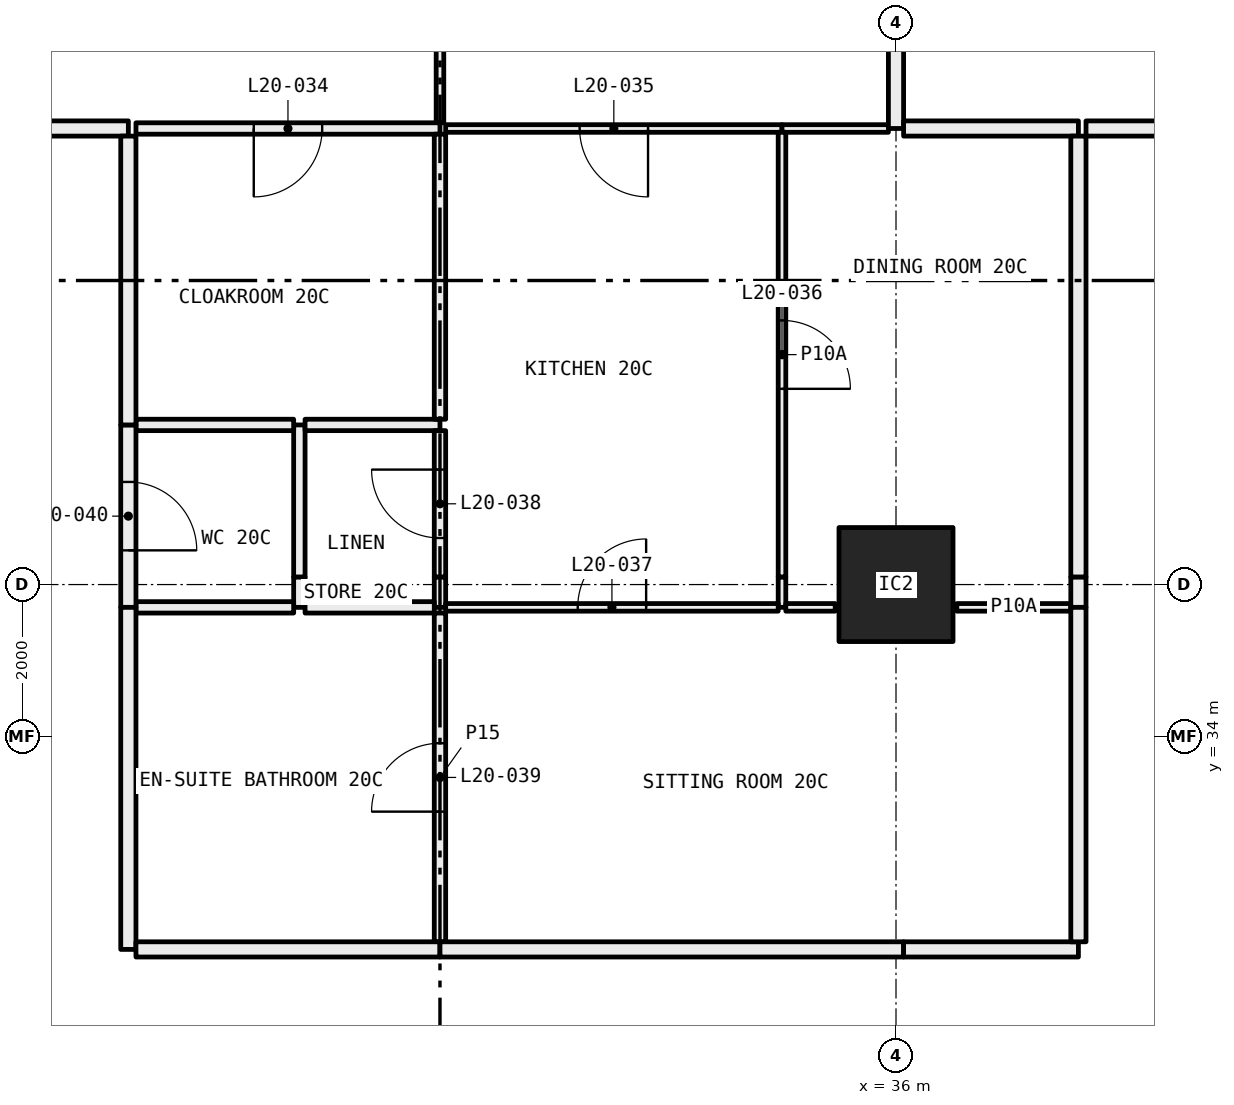
"""IFC4 building model, lengths in metres.
Left out: names, types, materials, properties, quantities, classifications, styles, units other than length and angle.
Written with IfcOpenShell. Run it as: python <this file> out.ifc"""

import sys

from ifc_helpers import new_model, si_unit, direction, frame, frame_2d, origin, origin_2d, place, context, subcontext, project, spatial, rectangle, hollow_rectangle, extrude, element, fill, save


model = new_model("IFC4")
c1 = context("Model", 3, precision=1e-05, world=origin(), true_north=direction((0.0, 1.0)))
c2 = subcontext(c1, "Body", "Model", "MODEL_VIEW")
j1 = project(units=[si_unit("LENGTHUNIT", "METRE"), si_unit("PLANEANGLEUNIT", "RADIAN")], contexts=[c1])
p1 = place(None, origin())
s1 = spatial("IfcSite", under=j1, at=p1, CompositionType="ELEMENT")
p2 = place(p1, origin())
s2 = spatial("IfcBuilding", under=s1, at=p2, CompositionType="ELEMENT")
p3 = place(p2, frame((0.0, 0.0, 81.75)))
s3 = spatial("IfcBuildingStorey", under=s2, at=p3, CompositionType="ELEMENT", Elevation=81.75)
p4 = place(p3, frame((36.0, 36.0, 0.0), z_axis=(0.0, 0.0, 1.0), x_axis=(1.0, 0.0, 0.0)))
e1 = element("IfcColumn", 1, at=p4, inside=s3, PredefinedType="COLUMN", context=c2, shape_type="SweptSolid", body=[
    extrude(hollow_rectangle(XDim=1.5, YDim=1.5, WallThickness=0.065, at=origin_2d()), origin(), (0.0, 0.0, 1.0), 3.05),
])
p5 = place(p3, frame((30.0, 42.075, 0.0), z_axis=(0.0, 0.0, 1.0), x_axis=(0.0, 1.0, 0.0)))
e2 = element("IfcWall", 2, at=p5, inside=s3, PredefinedType="PARTITIONING", context=c2, shape_type="SweptSolid", body=[
    extrude(rectangle(XDim=5.205, YDim=0.1, at=frame_2d((2.603, 0.0))), origin(), (0.0, 0.0, 1.0), 3.05),
])
p6 = place(p5, frame((2.153, 0.0, 0.0)))
e3 = element("IfcOpeningElement", 3, at=p6, cuts=e2, PredefinedType="OPENING", context=c2, shape_type="SweptSolid", body=[
    extrude(rectangle(XDim=0.9, YDim=2.1, at=frame_2d((0.45, 1.05))), frame((0.0, 0.06, 0.0), z_axis=(0.0, -1.0, 0.0), x_axis=(1.0, 0.0, 0.0)), (0.0, 0.0, 1.0), 0.12),
])
p7 = place(p3, frame((26.0, 42.0, 0.0), z_axis=(0.0, 0.0, 1.0), x_axis=(1.0, 0.0, 0.0)))
e4 = element("IfcWall", 4, at=p7, inside=s3, PredefinedType="PARTITIONING", context=c2, shape_type="SweptSolid", body=[
    extrude(rectangle(XDim=4.0, YDim=0.15, at=frame_2d((2.0, 0.0))), origin(), (0.0, 0.0, 1.0), 3.05),
])
p8 = place(p7, frame((1.55, 0.0, 0.0)))
e5 = element("IfcOpeningElement", 5, at=p8, cuts=e4, PredefinedType="OPENING", context=c2, shape_type="SweptSolid", body=[
    extrude(rectangle(XDim=0.9, YDim=2.1, at=frame_2d((0.45, 1.05))), frame((0.0, 0.085, 0.0), z_axis=(0.0, -1.0, 0.0), x_axis=(1.0, 0.0, 0.0)), (0.0, 0.0, 1.0), 0.17),
])
p9 = place(p3, frame((24.0, 42.0, 0.0), z_axis=(0.0, 0.0, 1.0), x_axis=(1.0, 0.0, 0.0)))
e6 = element("IfcWall", 6, at=p9, inside=s3, PredefinedType="PARTITIONING", context=c2, shape_type="SweptSolid", body=[
    extrude(rectangle(XDim=1.9, YDim=0.2, at=frame_2d((0.95, 0.0))), origin(), (0.0, 0.0, 1.0), 3.05),
])
p10 = place(p3, frame((30.075, 42.0, 0.0), z_axis=(0.0, 0.0, 1.0), x_axis=(1.0, 0.0, 0.0)))
e7 = element("IfcWall", 7, at=p10, inside=s3, PredefinedType="PARTITIONING", context=c2, shape_type="SweptSolid", body=[
    extrude(rectangle(XDim=4.425, YDim=0.1, at=frame_2d((2.212, 0.0))), origin(), (0.0, 0.0, 1.0), 3.05),
])
p11 = place(p10, frame((1.762, 0.0, 0.0)))
e8 = element("IfcOpeningElement", 8, at=p11, cuts=e7, PredefinedType="OPENING", context=c2, shape_type="SweptSolid", body=[
    extrude(rectangle(XDim=0.9, YDim=2.1, at=frame_2d((0.45, 1.05))), frame((0.0, 0.06, 0.0), z_axis=(0.0, -1.0, 0.0), x_axis=(1.0, 0.0, 0.0)), (0.0, 0.0, 1.0), 0.12),
])
p12 = place(p3, frame((34.5, 42.0, 0.0), z_axis=(0.0, 0.0, 1.0), x_axis=(1.0, 0.0, 0.0)))
e9 = element("IfcWall", 9, at=p12, inside=s3, PredefinedType="PARTITIONING", context=c2, shape_type="SweptSolid", body=[
    extrude(rectangle(XDim=1.4, YDim=0.1, at=frame_2d((0.7, 0.0))), origin(), (0.0, 0.0, 1.0), 3.05),
])
p13 = place(p3, frame((36.0, 42.0, 0.0), z_axis=(0.0, 0.0, 1.0), x_axis=(0.0, 1.0, 0.0)))
e10 = element("IfcWall", 10, at=p13, inside=s3, PredefinedType="PARTITIONING", context=c2, shape_type="SweptSolid", body=[
    extrude(rectangle(XDim=3.0, YDim=0.2, at=frame_2d((1.5, 0.0))), origin(), (0.0, 0.0, 1.0), 2.45),
])
p14 = place(p3, frame((28.15, 35.7, 0.0), z_axis=(0.0, 0.0, 1.0), x_axis=(0.0, 1.0, 0.0)))
e11 = element("IfcWall", 11, at=p14, inside=s3, PredefinedType="PARTITIONING", context=c2, shape_type="SweptSolid", body=[
    extrude(rectangle(XDim=0.4, YDim=0.15, at=frame_2d((0.2, 0.0))), origin(), (0.0, 0.0, 1.0), 2.45),
])
p15 = place(p3, frame((28.15, 36.1, 0.0), z_axis=(0.0, 0.0, 1.0), x_axis=(0.0, 1.0, 0.0)))
e12 = element("IfcWall", 12, at=p15, inside=s3, PredefinedType="PARTITIONING", context=c2, shape_type="SweptSolid", body=[
    extrude(rectangle(XDim=2.0, YDim=0.15, at=frame_2d((1.0, 0.0))), origin(), (0.0, 0.0, 1.0), 3.05),
])
for number, where, z_axis, x_axis in (
    (13, (28.075, 38.1, 0.0), (0.0, 0.0, 1.0), (-1.0, 0.0, 0.0)),
    (14, (26.0, 35.7, 0.0), (0.0, 0.0, 1.0), (1.0, 0.0, 0.0)),
):
    element("IfcWall", number, at=place(p3, frame(where, z_axis=z_axis, x_axis=x_axis)), inside=s3, PredefinedType="PARTITIONING", context=c2, shape_type="SweptSolid", body=[
        extrude(rectangle(XDim=2.075, YDim=0.15, at=frame_2d((1.038, 0.0))), origin(), (0.0, 0.0, 1.0), 3.05),
    ])
p16 = place(p3, frame((25.9, 38.1, 0.0), z_axis=(0.0, 0.0, 1.0), x_axis=(0.0, -1.0, 0.0)))
e15 = element("IfcWall", 15, at=p16, inside=s3, PredefinedType="PARTITIONING", context=c2, shape_type="SweptSolid", body=[
    extrude(rectangle(XDim=2.4, YDim=0.2, at=frame_2d((1.2, 0.0))), origin(), (0.0, 0.0, 1.0), 2.45),
])
p17 = place(p16, frame((0.75, 0.0, 0.0)))
e16 = element("IfcOpeningElement", 16, at=p17, cuts=e15, PredefinedType="OPENING", context=c2, shape_type="SweptSolid", body=[
    extrude(rectangle(XDim=0.9, YDim=2.1, at=frame_2d((0.45, 1.05))), frame((0.0, 0.11, 0.0), z_axis=(0.0, -1.0, 0.0), x_axis=(1.0, 0.0, 0.0)), (0.0, 0.0, 1.0), 0.22),
])
p18 = place(p3, frame((30.0, 38.1, 0.0), z_axis=(0.0, 0.0, 1.0), x_axis=(-1.0, 0.0, 0.0)))
e17 = element("IfcWall", 17, at=p18, inside=s3, PredefinedType="PARTITIONING", context=c2, shape_type="SweptSolid", body=[
    extrude(rectangle(XDim=1.775, YDim=0.15, at=frame_2d((0.887, 0.0))), origin(), (0.0, 0.0, 1.0), 3.05),
])
p19 = place(p3, frame((30.0, 35.7, 0.0), z_axis=(0.0, 0.0, 1.0), x_axis=(0.0, 1.0, 0.0)))
e18 = element("IfcWall", 18, at=p19, inside=s3, PredefinedType="PARTITIONING", context=c2, shape_type="SweptSolid", body=[
    extrude(rectangle(XDim=0.4, YDim=0.15, at=frame_2d((0.2, 0.0))), origin(), (0.0, 0.0, 1.0), 2.45),
])
p20 = place(p3, frame((30.0, 36.1, 0.0), z_axis=(0.0, 0.0, 1.0), x_axis=(0.0, 1.0, 0.0)))
e19 = element("IfcWall", 19, at=p20, inside=s3, PredefinedType="PARTITIONING", context=c2, shape_type="SweptSolid", body=[
    extrude(rectangle(XDim=1.925, YDim=0.15, at=frame_2d((0.962, 0.0))), origin(), (0.0, 0.0, 1.0), 3.05),
])
p21 = place(p20, frame((0.512, 0.0, 0.0)))
e20 = element("IfcOpeningElement", 20, at=p21, cuts=e19, PredefinedType="OPENING", context=c2, shape_type="SweptSolid", body=[
    extrude(rectangle(XDim=0.9, YDim=2.1, at=frame_2d((0.45, 1.05))), frame((0.0, 0.085, 0.0), z_axis=(0.0, -1.0, 0.0), x_axis=(1.0, 0.0, 0.0)), (0.0, 0.0, 1.0), 0.17),
])
p22 = place(p3, frame((28.225, 35.7, 0.0), z_axis=(0.0, 0.0, 1.0), x_axis=(1.0, 0.0, 0.0)))
e21 = element("IfcWall", 21, at=p22, inside=s3, PredefinedType="PARTITIONING", context=c2, shape_type="SweptSolid", body=[
    extrude(rectangle(XDim=1.7, YDim=0.15, at=frame_2d((0.85, 0.0))), origin(), (0.0, 0.0, 1.0), 3.05),
])
p23 = place(p3, frame((30.0, 38.175, 0.0), z_axis=(0.0, 0.0, 1.0), x_axis=(0.0, 1.0, 0.0)))
e22 = element("IfcWall", 22, at=p23, inside=s3, PredefinedType="PARTITIONING", context=c2, shape_type="SweptSolid", body=[
    extrude(rectangle(XDim=3.75, YDim=0.15, at=frame_2d((1.875, 0.0))), origin(), (0.0, 0.0, 1.0), 3.05),
])
p24 = place(p3, frame((25.9, 41.9, 0.0), z_axis=(0.0, 0.0, 1.0), x_axis=(0.0, -1.0, 0.0)))
e23 = element("IfcWall", 23, at=p24, inside=s3, PredefinedType="PARTITIONING", context=c2, shape_type="SweptSolid", body=[
    extrude(rectangle(XDim=3.8, YDim=0.2, at=frame_2d((1.9, 0.0))), origin(), (0.0, 0.0, 1.0), 3.05),
])
p25 = place(p3, frame((34.5, 35.7, 0.0), z_axis=(0.0, 0.0, 1.0), x_axis=(0.0, 1.0, 0.0)))
e24 = element("IfcWall", 24, at=p25, inside=s3, PredefinedType="PARTITIONING", context=c2, shape_type="SweptSolid", body=[
    extrude(rectangle(XDim=0.4, YDim=0.1, at=frame_2d((0.2, 0.0))), origin(), (0.0, 0.0, 1.0), 2.45),
])
p26 = place(p3, frame((34.5, 36.1, 0.0), z_axis=(0.0, 0.0, 1.0), x_axis=(0.0, 1.0, 0.0)))
e25 = element("IfcWall", 25, at=p26, inside=s3, PredefinedType="PARTITIONING", context=c2, shape_type="SweptSolid", body=[
    extrude(rectangle(XDim=5.85, YDim=0.1, at=frame_2d((2.925, 0.0))), origin(), (0.0, 0.0, 1.0), 3.05),
])
p27 = place(p26, frame((2.475, 0.0, 0.0)))
e26 = element("IfcOpeningElement", 26, at=p27, cuts=e25, PredefinedType="OPENING", context=c2, shape_type="SweptSolid", body=[
    extrude(rectangle(XDim=0.9, YDim=2.1, at=frame_2d((0.45, 1.05))), frame((0.0, 0.06, 0.0), z_axis=(0.0, -1.0, 0.0), x_axis=(1.0, 0.0, 0.0)), (0.0, 0.0, 1.0), 0.12),
])
p28 = place(p3, frame((30.075, 35.7, 0.0), z_axis=(0.0, 0.0, 1.0), x_axis=(1.0, 0.0, 0.0)))
e27 = element("IfcWall", 27, at=p28, inside=s3, PredefinedType="PARTITIONING", context=c2, shape_type="SweptSolid", body=[
    extrude(rectangle(XDim=4.375, YDim=0.1, at=frame_2d((2.188, 0.0))), origin(), (0.0, 0.0, 1.0), 3.05),
])
p29 = place(p28, frame((1.738, 0.0, 0.0)))
e28 = element("IfcOpeningElement", 28, at=p29, cuts=e27, PredefinedType="OPENING", context=c2, shape_type="SweptSolid", body=[
    extrude(rectangle(XDim=0.9, YDim=2.1, at=frame_2d((0.45, 1.05))), frame((0.0, 0.06, 0.0), z_axis=(0.0, -1.0, 0.0), x_axis=(1.0, 0.0, 0.0)), (0.0, 0.0, 1.0), 0.12),
])
p30 = place(p3, frame((34.55, 35.7, 0.0), z_axis=(0.0, 0.0, 1.0), x_axis=(1.0, 0.0, 0.0)))
e29 = element("IfcWall", 29, at=p30, inside=s3, PredefinedType="PARTITIONING", context=c2, shape_type="SweptSolid", body=[
    extrude(rectangle(XDim=0.65, YDim=0.1, at=frame_2d((0.325, 0.0))), origin(), (0.0, 0.0, 1.0), 3.05),
])
p31 = place(p3, frame((36.8, 35.7, 0.0), z_axis=(0.0, 0.0, 1.0), x_axis=(1.0, 0.0, 0.0)))
e30 = element("IfcWall", 30, at=p31, inside=s3, PredefinedType="PARTITIONING", context=c2, shape_type="SweptSolid", body=[
    extrude(rectangle(XDim=1.5, YDim=0.1, at=frame_2d((0.75, 0.0))), origin(), (0.0, 0.0, 1.0), 3.05),
])
p32 = place(p3, frame((38.4, 42.0, 0.0), z_axis=(0.0, 0.0, 1.0), x_axis=(-1.0, 0.0, 0.0)))
e31 = element("IfcWall", 31, at=p32, inside=s3, PredefinedType="PARTITIONING", context=c2, shape_type="SweptSolid", body=[
    extrude(rectangle(XDim=2.3, YDim=0.2, at=frame_2d((1.15, 0.0))), origin(), (0.0, 0.0, 1.0), 3.05),
])
p33 = place(p3, frame((38.4, 35.7, 0.0), z_axis=(0.0, 0.0, 1.0), x_axis=(0.0, 1.0, 0.0)))
e32 = element("IfcWall", 32, at=p33, inside=s3, PredefinedType="PARTITIONING", context=c2, shape_type="SweptSolid", body=[
    extrude(rectangle(XDim=0.4, YDim=0.2, at=frame_2d((0.2, 0.0))), origin(), (0.0, 0.0, 1.0), 2.45),
])
p34 = place(p3, frame((38.4, 36.1, 0.0), z_axis=(0.0, 0.0, 1.0), x_axis=(0.0, 1.0, 0.0)))
e33 = element("IfcWall", 33, at=p34, inside=s3, PredefinedType="PARTITIONING", context=c2, shape_type="SweptSolid", body=[
    extrude(rectangle(XDim=5.8, YDim=0.2, at=frame_2d((2.9, 0.0))), origin(), (0.0, 0.0, 1.0), 3.05),
])
p35 = place(p3, frame((30.0, 31.3, 0.0), z_axis=(0.0, 0.0, 1.0), x_axis=(0.0, 1.0, 0.0)))
e34 = element("IfcWall", 34, at=p35, inside=s3, PredefinedType="PARTITIONING", context=c2, shape_type="SweptSolid", body=[
    extrude(rectangle(XDim=4.325, YDim=0.15, at=frame_2d((2.163, 0.0))), origin(), (0.0, 0.0, 1.0), 3.05),
])
p36 = place(p35, frame((1.712, 0.0, 0.0)))
e35 = element("IfcOpeningElement", 35, at=p36, cuts=e34, PredefinedType="OPENING", context=c2, shape_type="SweptSolid", body=[
    extrude(rectangle(XDim=0.9, YDim=2.1, at=frame_2d((0.45, 1.05))), frame((0.0, 0.085, 0.0), z_axis=(0.0, -1.0, 0.0), x_axis=(1.0, 0.0, 0.0)), (0.0, 0.0, 1.0), 0.17),
])
p37 = place(p3, frame((25.9, 35.7, 0.0), z_axis=(0.0, 0.0, 1.0), x_axis=(0.0, -1.0, 0.0)))
e36 = element("IfcWall", 36, at=p37, inside=s3, PredefinedType="PARTITIONING", context=c2, shape_type="SweptSolid", body=[
    extrude(rectangle(XDim=4.5, YDim=0.2, at=frame_2d((2.25, 0.0))), origin(), (0.0, 0.0, 1.0), 3.05),
])
p38 = place(p3, frame((26.0, 31.2, 0.0), z_axis=(0.0, 0.0, 1.0), x_axis=(1.0, 0.0, 0.0)))
e37 = element("IfcWall", 37, at=p38, inside=s3, PredefinedType="PARTITIONING", context=c2, shape_type="SweptSolid", body=[
    extrude(rectangle(XDim=4.0, YDim=0.2, at=frame_2d((2.0, 0.0))), origin(), (0.0, 0.0, 1.0), 3.05),
])
p39 = place(p3, frame((30.0, 31.2, 0.0), z_axis=(0.0, 0.0, 1.0), x_axis=(1.0, 0.0, 0.0)))
e38 = element("IfcWall", 38, at=p39, inside=s3, PredefinedType="PARTITIONING", context=c2, shape_type="SweptSolid", body=[
    extrude(rectangle(XDim=6.1, YDim=0.2, at=frame_2d((3.05, 0.0))), origin(), (0.0, 0.0, 1.0), 2.45),
])
p40 = place(p3, frame((36.1, 31.2, 0.0), z_axis=(0.0, 0.0, 1.0), x_axis=(1.0, 0.0, 0.0)))
e39 = element("IfcWall", 39, at=p40, inside=s3, PredefinedType="PARTITIONING", context=c2, shape_type="SweptSolid", body=[
    extrude(rectangle(XDim=2.3, YDim=0.2, at=frame_2d((1.15, 0.0))), origin(), (0.0, 0.0, 1.0), 3.05),
])
p41 = place(p3, frame((38.4, 31.3, 0.0), z_axis=(0.0, 0.0, 1.0), x_axis=(0.0, 1.0, 0.0)))
e40 = element("IfcWall", 40, at=p41, inside=s3, PredefinedType="PARTITIONING", context=c2, shape_type="SweptSolid", body=[
    extrude(rectangle(XDim=4.4, YDim=0.2, at=frame_2d((2.2, 0.0))), origin(), (0.0, 0.0, 1.0), 3.05),
])
p42 = place(p3, frame((38.5, 42.0, 0.0), z_axis=(0.0, 0.0, 1.0), x_axis=(1.0, 0.0, 0.0)))
e41 = element("IfcWall", 41, at=p42, inside=s3, PredefinedType="PARTITIONING", context=c2, shape_type="SweptSolid", body=[
    extrude(rectangle(XDim=2.3, YDim=0.2, at=frame_2d((1.15, 0.0))), origin(), (0.0, 0.0, 1.0), 3.05),
])
p43 = place(p8, frame((0.9, 0.0, 0.0), x_axis=(-1.0, 0.0, 0.0)))
e42 = element("IfcDoor", 42, at=p43, inside=s3, OperationType="SINGLE_SWING_LEFT", PredefinedType="DOOR", context=c2, shape_type="SweptSolid", body=[
    extrude(rectangle(XDim=0.9, YDim=2.1, at=frame_2d((0.45, 1.05))), frame((0.0, 0.025, 0.0), z_axis=(0.0, -1.0, 0.0), x_axis=(1.0, 0.0, 0.0)), (0.0, 0.0, 1.0), 0.05),
])
fill(e5, e42)
p44 = place(p11, frame((0.9, 0.0, 0.0), x_axis=(-1.0, 0.0, 0.0)))
e43 = element("IfcDoor", 43, at=p44, inside=s3, OperationType="SINGLE_SWING_RIGHT", PredefinedType="DOOR", context=c2, shape_type="SweptSolid", body=[
    extrude(rectangle(XDim=0.9, YDim=2.1, at=frame_2d((0.45, 1.05))), frame((0.0, 0.025, 0.0), z_axis=(0.0, -1.0, 0.0), x_axis=(1.0, 0.0, 0.0)), (0.0, 0.0, 1.0), 0.05),
])
fill(e8, e43)
p45 = place(p27, frame((0.9, 0.0, 0.0), x_axis=(-1.0, 0.0, 0.0)))
e44 = element("IfcDoor", 44, at=p45, inside=s3, OperationType="SINGLE_SWING_LEFT", PredefinedType="DOOR", context=c2, shape_type="SweptSolid", body=[
    extrude(rectangle(XDim=0.9, YDim=2.1, at=frame_2d((0.45, 1.05))), frame((0.0, 0.025, 0.0), z_axis=(0.0, -1.0, 0.0), x_axis=(1.0, 0.0, 0.0)), (0.0, 0.0, 1.0), 0.05),
])
fill(e26, e44)
p46 = place(p29, origin())
e45 = element("IfcDoor", 45, at=p46, inside=s3, OperationType="SINGLE_SWING_LEFT", PredefinedType="DOOR", context=c2, shape_type="SweptSolid", body=[
    extrude(rectangle(XDim=0.9, YDim=2.1, at=frame_2d((0.45, 1.05))), frame((0.0, 0.025, 0.0), z_axis=(0.0, -1.0, 0.0), x_axis=(1.0, 0.0, 0.0)), (0.0, 0.0, 1.0), 0.05),
])
fill(e28, e45)
p47 = place(p21, origin())
e46 = element("IfcDoor", 46, at=p47, inside=s3, OperationType="SINGLE_SWING_LEFT", PredefinedType="DOOR", context=c2, shape_type="SweptSolid", body=[
    extrude(rectangle(XDim=0.9, YDim=2.1, at=frame_2d((0.45, 1.05))), frame((0.0, 0.025, 0.0), z_axis=(0.0, -1.0, 0.0), x_axis=(1.0, 0.0, 0.0)), (0.0, 0.0, 1.0), 0.05),
])
fill(e20, e46)
p48 = place(p36, origin())
e47 = element("IfcDoor", 47, at=p48, inside=s3, OperationType="SINGLE_SWING_RIGHT", PredefinedType="DOOR", context=c2, shape_type="SweptSolid", body=[
    extrude(rectangle(XDim=0.9, YDim=2.1, at=frame_2d((0.45, 1.05))), frame((0.0, 0.025, 0.0), z_axis=(0.0, -1.0, 0.0), x_axis=(1.0, 0.0, 0.0)), (0.0, 0.0, 1.0), 0.05),
])
fill(e35, e47)
p49 = place(p17, origin())
e48 = element("IfcDoor", 48, at=p49, inside=s3, OperationType="SINGLE_SWING_LEFT", PredefinedType="DOOR", context=c2, shape_type="SweptSolid", body=[
    extrude(rectangle(XDim=0.9, YDim=2.1, at=frame_2d((0.45, 1.05))), frame((0.0, 0.025, 0.0), z_axis=(0.0, -1.0, 0.0), x_axis=(1.0, 0.0, 0.0)), (0.0, 0.0, 1.0), 0.05),
])
fill(e16, e48)
save(model, sys.argv[1])
